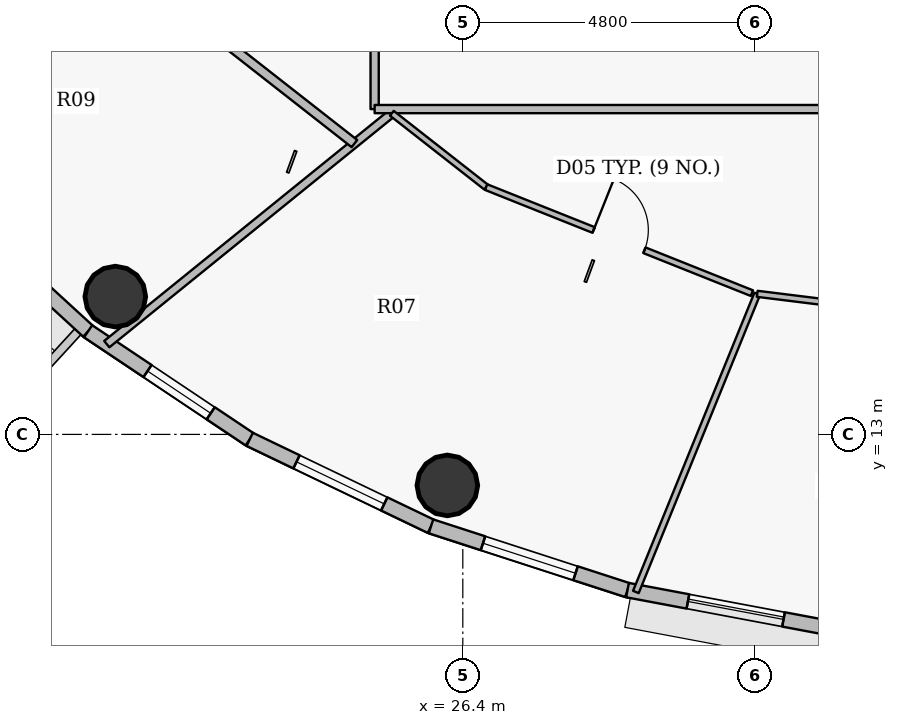
"""IFC4 building model, lengths in metres.
Left out: names, types, materials, properties, quantities, classifications, styles, units other than length and angle.
Written with IfcOpenShell. Run it as: python <this file> out.ifc"""

import sys

from ifc_helpers import new_model, si_unit, direction, frame, frame_2d, origin, origin_2d, place, context, subcontext, project, spatial, rectangle, hollow_circle, extrude, source, transform, mapped, element, fill, save


model = new_model("IFC4")
c1 = context("Model", 3, precision=1e-05, world=origin(), true_north=direction((0.0, 1.0)))
c2 = subcontext(c1, "Body", "Model", "MODEL_VIEW")
j1 = project(units=[si_unit("LENGTHUNIT", "METRE"), si_unit("PLANEANGLEUNIT", "RADIAN")], contexts=[c1])
p1 = place(None, origin())
s1 = spatial("IfcSite", under=j1, at=p1, CompositionType="ELEMENT")
p2 = place(p1, origin())
s2 = spatial("IfcBuilding", under=s1, at=p2, CompositionType="ELEMENT")
p3 = place(p2, frame((0.0, 0.0, 306.75)))
s3 = spatial("IfcBuildingStorey", under=s2, at=p3, CompositionType="ELEMENT", Elevation=306.75)
for number, where, z_axis, x_axis in (
    (1, (20.685, 15.267, 0.0), (0.0, 0.0, 1.0), (1.0, 0.0, 0.0)),
    (2, (26.146, 12.161, 0.0), (0.0, 0.0, 1.0), (1.0, 0.0, 0.0)),
):
    element("IfcColumn", number, at=place(p3, frame(where, z_axis=z_axis, x_axis=x_axis)), inside=s3, PredefinedType="COLUMN", context=c2, shape_type="SweptSolid", body=[
        extrude(hollow_circle(Radius=0.5, WallThickness=0.032, at=origin_2d()), origin(), (0.0, 0.0, 1.0), 3.75),
    ])
p4 = place(p3, frame((20.238, 14.696, 0.0), z_axis=(0.0, 0.0, 1.0), x_axis=(-0.737068506972, 0.675818034703, 0.0)))
e3 = element("IfcWall", 3, at=p4, inside=s3, PredefinedType="SOLIDWALL", context=c2, shape_type="SweptSolid", body=[
    extrude(rectangle(XDim=3.077, YDim=0.24, at=frame_2d((1.539, 0.0))), origin(), (0.0, 0.0, 1.0), 3.5),
])
p5 = place(p3, frame((22.896, 12.918, 0.0), z_axis=(0.0, 0.0, 1.0), x_axis=(-0.831250592635, 0.55589787933, 0.0)))
e4 = element("IfcWall", 4, at=p5, inside=s3, PredefinedType="SOLIDWALL", context=c2, shape_type="SweptSolid", body=[
    extrude(rectangle(XDim=3.197, YDim=0.24, at=frame_2d((1.599, 0.0))), origin(), (0.0, 0.0, 1.0), 3.5),
])
p6 = place(p5, frame((0.772, 0.0, 0.9)))
e5 = element("IfcOpeningElement", 5, at=p6, cuts=e4, PredefinedType="OPENING", context=c2, shape_type="SweptSolid", body=[
    extrude(rectangle(XDim=1.25, YDim=1.65, at=origin_2d()), frame((0.625, 0.13, 0.825), z_axis=(0.0, -1.0, 0.0), x_axis=(1.0, 0.0, 0.0)), (0.0, 0.0, 1.0), 0.26),
])
p7 = place(p3, frame((25.877, 11.488, 0.0), z_axis=(0.0, 0.0, 1.0), x_axis=(-0.901573741254, 0.43262546051, 0.0)))
e6 = element("IfcWall", 6, at=p7, inside=s3, PredefinedType="SOLIDWALL", context=c2, shape_type="SweptSolid", body=[
    extrude(rectangle(XDim=3.307, YDim=0.24, at=frame_2d((1.653, 0.0))), origin(), (0.0, 0.0, 1.0), 3.5),
])
p8 = place(p7, frame((0.853, 0.0, 0.9)))
e7 = element("IfcOpeningElement", 7, at=p8, cuts=e6, PredefinedType="OPENING", context=c2, shape_type="SweptSolid", body=[
    extrude(rectangle(XDim=1.6, YDim=1.75, at=origin_2d()), frame((0.8, 0.13, 0.875), z_axis=(0.0, -1.0, 0.0), x_axis=(1.0, 0.0, 0.0)), (0.0, 0.0, 1.0), 0.26),
])
p9 = place(p3, frame((29.109, 10.44, 0.0), z_axis=(0.0, 0.0, 1.0), x_axis=(-0.95123136723, 0.308478339592, 0.0)))
e8 = element("IfcWall", 8, at=p9, inside=s3, PredefinedType="SOLIDWALL", context=c2, shape_type="SweptSolid", body=[
    extrude(rectangle(XDim=3.398, YDim=0.24, at=frame_2d((1.699, 0.0))), origin(), (0.0, 0.0, 1.0), 3.5),
])
p10 = place(p9, frame((0.899, 0.0, 0.9)))
e9 = element("IfcOpeningElement", 9, at=p10, cuts=e8, PredefinedType="OPENING", context=c2, shape_type="SweptSolid", body=[
    extrude(rectangle(XDim=1.6, YDim=1.75, at=origin_2d()), frame((0.8, 0.13, 0.875), z_axis=(0.0, -1.0, 0.0), x_axis=(1.0, 0.0, 0.0)), (0.0, 0.0, 1.0), 0.26),
])
p11 = place(p3, frame((32.511, 9.8, 0.0), z_axis=(0.0, 0.0, 1.0), x_axis=(-0.982782655757, 0.184765395959, 0.0)))
e10 = element("IfcWall", 10, at=p11, inside=s3, PredefinedType="SOLIDWALL", context=c2, shape_type="SweptSolid", body=[
    extrude(rectangle(XDim=3.462, YDim=0.24, at=frame_2d((1.731, 0.0))), origin(), (0.0, 0.0, 1.0), 3.5),
])
p12 = place(p11, frame((0.851, 0.0, 0.9)))
e11 = element("IfcOpeningElement", 11, at=p12, cuts=e10, PredefinedType="OPENING", context=c2, shape_type="SweptSolid", body=[
    extrude(rectangle(XDim=1.6, YDim=1.75, at=origin_2d()), frame((0.8, 0.13, 0.875), z_axis=(0.0, -1.0, 0.0), x_axis=(1.0, 0.0, 0.0)), (0.0, 0.0, 1.0), 0.26),
])
p13 = place(p3, frame((20.545, 14.485, 0.0), z_axis=(0.0, 0.0, 1.0), x_axis=(0.77715155867, 0.629313479004, 0.0)))
e12 = element("IfcWall", 12, at=p13, inside=s3, PredefinedType="PARTITIONING", context=c2, shape_type="SweptSolid", body=[
    extrude(rectangle(XDim=6.032, YDim=0.135, at=frame_2d((3.016, 0.0))), origin(), (0.0, 0.0, 1.0), 2.985),
])
p14 = place(p3, frame((22.59, 19.371, 0.0), z_axis=(0.0, 0.0, 1.0), x_axis=(0.78729093539, -0.616581692116, 0.0)))
e13 = element("IfcWall", 13, at=p14, inside=s3, PredefinedType="PARTITIONING", context=c2, shape_type="SweptSolid", body=[
    extrude(rectangle(XDim=2.576, YDim=0.15, at=frame_2d((1.288, 0.0))), origin(), (0.0, 0.0, 1.0), 3.035),
])
p15 = place(p3, frame((24.95, 18.35, 0.0), z_axis=(0.0, 0.0, 1.0), x_axis=(0.0, 1.0, 0.0)))
e14 = element("IfcWall", 14, at=p15, inside=s3, PredefinedType="PARTITIONING", context=c2, shape_type="SweptSolid", body=[
    extrude(rectangle(XDim=11.45, YDim=0.135, at=frame_2d((5.725, 0.0))), origin(), (0.0, 0.0, 1.0), 3.035),
])
p16 = place(p15, frame((7.931, 0.0, 0.0)))
e15 = element("IfcOpeningElement", 15, at=p16, cuts=e14, PredefinedType="OPENING", context=c2, shape_type="SweptSolid", body=[
    extrude(rectangle(XDim=1.05, YDim=2.15, at=origin_2d()), frame((0.525, 0.078, 1.075), z_axis=(0.0, -1.0, 0.0), x_axis=(1.0, 0.0, 0.0)), (0.0, 0.0, 1.0), 0.155),
])
p17 = place(p15, frame((2.361, 0.0, 0.0)))
e16 = element("IfcOpeningElement", 16, at=p17, cuts=e14, PredefinedType="OPENING", context=c2, shape_type="SweptSolid", body=[
    extrude(rectangle(XDim=0.82, YDim=2.1, at=origin_2d()), frame((0.41, 0.078, 1.05), z_axis=(0.0, -1.0, 0.0), x_axis=(1.0, 0.0, 0.0)), (0.0, 0.0, 1.0), 0.155),
])
p18 = place(p3, frame((24.95, 18.35, 0.0), z_axis=(0.0, 0.0, 1.0), x_axis=(1.0, 0.0, 0.0)))
e17 = element("IfcWall", 17, at=p18, inside=s3, PredefinedType="PARTITIONING", context=c2, shape_type="SweptSolid", body=[
    extrude(rectangle(XDim=19.311, YDim=0.135, at=frame_2d((9.655, 0.0))), origin(), (0.0, 0.0, 1.0), 3.035),
])
p19 = place(p18, frame((9.319, 0.0, 0.0)))
e18 = element("IfcOpeningElement", 18, at=p19, cuts=e17, PredefinedType="OPENING", context=c2, shape_type="SweptSolid", body=[
    extrude(rectangle(XDim=1.0, YDim=2.15, at=origin_2d()), frame((0.5, 0.078, 1.075), z_axis=(0.0, -1.0, 0.0), x_axis=(1.0, 0.0, 0.0)), (0.0, 0.0, 1.0), 0.155),
])
p20 = place(p3, frame((25.233, 18.281, 0.0), z_axis=(0.0, 0.0, 1.0), x_axis=(0.787345395334, -0.61651214785, 0.0)))
e19 = element("IfcWall", 19, at=p20, inside=s3, PredefinedType="PARTITIONING", context=c2, shape_type="SweptSolid", body=[
    extrude(rectangle(XDim=1.969, YDim=0.1, at=frame_2d((0.985, 0.0))), origin(), (0.0, 0.0, 1.0), 3.5),
])
p21 = place(p3, frame((26.783, 17.067, 0.0), z_axis=(0.0, 0.0, 1.0), x_axis=(0.928809047774, -0.370558703544, 0.0)))
e20 = element("IfcWall", 20, at=p21, inside=s3, PredefinedType="PARTITIONING", context=c2, shape_type="SweptSolid", body=[
    extrude(rectangle(XDim=4.706, YDim=0.1, at=frame_2d((2.353, 0.0))), origin(), (0.0, 0.0, 1.0), 3.035),
])
p22 = place(p21, frame((1.903, 0.0, 0.0)))
e21 = element("IfcOpeningElement", 21, at=p22, cuts=e20, PredefinedType="OPENING", context=c2, shape_type="SweptSolid", body=[
    extrude(rectangle(XDim=0.9, YDim=2.1, at=origin_2d()), frame((0.45, 0.06, 1.05), z_axis=(0.0, -1.0, 0.0), x_axis=(1.0, 0.0, 0.0)), (0.0, 0.0, 1.0), 0.12),
])
p23 = place(p3, frame((29.246, 10.409, 0.0), z_axis=(0.0, 0.0, 1.0), x_axis=(0.377005355791, 0.926211078375, 0.0)))
e22 = element("IfcWall", 22, at=p23, inside=s3, PredefinedType="PARTITIONING", context=c2, shape_type="SweptSolid", body=[
    extrude(rectangle(XDim=5.294, YDim=0.1, at=frame_2d((2.647, 0.0))), origin(), (0.0, 0.0, 1.0), 2.985),
])
p24 = place(p3, frame((31.242, 15.312, 0.0), z_axis=(0.0, 0.0, 1.0), x_axis=(0.992396501967, -0.123082016895, 0.0)))
e23 = element("IfcWall", 23, at=p24, inside=s3, PredefinedType="PARTITIONING", context=c2, shape_type="SweptSolid", body=[
    extrude(rectangle(XDim=4.794, YDim=0.1, at=frame_2d((2.397, 0.0))), origin(), (0.0, 0.0, 1.0), 2.985),
])
p25 = place(p24, frame((1.947, 0.0, 0.0)))
e24 = element("IfcOpeningElement", 24, at=p25, cuts=e23, PredefinedType="OPENING", context=c2, shape_type="SweptSolid", body=[
    extrude(rectangle(XDim=0.9, YDim=2.1, at=origin_2d()), frame((0.45, 0.06, 1.05), z_axis=(0.0, -1.0, 0.0), x_axis=(1.0, 0.0, 0.0)), (0.0, 0.0, 1.0), 0.12),
])
m1 = source(origin(), c2, "Body", "SweptSolid", [
    extrude(rectangle(XDim=1.25, YDim=1.65, at=origin_2d()), frame((0.625, 0.03, 0.825), z_axis=(0.0, -1.0, 0.0), x_axis=(1.0, 0.0, 0.0)), (0.0, 0.0, 1.0), 0.06),
])
p26 = place(p6, origin())
e25 = element("IfcWindow", 25, at=p26, inside=s3, PartitioningType="SINGLE_PANEL", PredefinedType="WINDOW", context=c2, shape_type="MappedRepresentation", body=[
    mapped(m1, transform((0.0, 0.0, 0.0), x_axis=(1.0, 0.0, 0.0), y_axis=(0.0, 1.0, 0.0), z_axis=(0.0, 0.0, 1.0), scale=1.0)),
])
fill(e5, e25)
m2 = source(origin(), c2, "Body", "SweptSolid", [
    extrude(rectangle(XDim=1.6, YDim=1.75, at=origin_2d()), frame((0.8, 0.03, 0.875), z_axis=(0.0, -1.0, 0.0), x_axis=(1.0, 0.0, 0.0)), (0.0, 0.0, 1.0), 0.06),
])
p27 = place(p8, origin())
e26 = element("IfcWindow", 26, at=p27, inside=s3, PartitioningType="DOUBLE_PANEL_VERTICAL", PredefinedType="WINDOW", context=c2, shape_type="MappedRepresentation", body=[
    mapped(m2, transform((0.0, 0.0, 0.0), x_axis=(1.0, 0.0, 0.0), y_axis=(0.0, 1.0, 0.0), z_axis=(0.0, 0.0, 1.0), scale=1.0)),
])
fill(e7, e26)
p28 = place(p10, origin())
e27 = element("IfcWindow", 27, at=p28, inside=s3, PartitioningType="DOUBLE_PANEL_VERTICAL", PredefinedType="WINDOW", context=c2, shape_type="MappedRepresentation", body=[
    mapped(m2, transform((0.0, 0.0, 0.0), x_axis=(1.0, 0.0, 0.0), y_axis=(0.0, 1.0, 0.0), z_axis=(0.0, 0.0, 1.0), scale=1.0)),
])
fill(e9, e27)
p29 = place(p12, origin())
e28 = element("IfcWindow", 28, at=p29, inside=s3, PartitioningType="DOUBLE_PANEL_VERTICAL", PredefinedType="WINDOW", context=c2, shape_type="MappedRepresentation", body=[
    mapped(m2, transform((0.0, 0.0, 0.0), x_axis=(1.0, 0.0, 0.0), y_axis=(0.0, 1.0, 0.0), z_axis=(0.0, 0.0, 1.0), scale=1.0)),
])
fill(e11, e28)
m3 = source(origin(), c2, "Body", "SweptSolid", [
    extrude(rectangle(XDim=0.9, YDim=2.1, at=origin_2d()), frame((0.45, 0.025, 1.05), z_axis=(0.0, -1.0, 0.0), x_axis=(1.0, 0.0, 0.0)), (0.0, 0.0, 1.0), 0.05),
])
p30 = place(p22, origin())
e29 = element("IfcDoor", 29, at=p30, inside=s3, OperationType="SINGLE_SWING_LEFT", PredefinedType="DOOR", context=c2, shape_type="MappedRepresentation", body=[
    mapped(m3, transform((0.0, 0.0, 0.0), x_axis=(1.0, 0.0, 0.0), y_axis=(0.0, 1.0, 0.0), z_axis=(0.0, 0.0, 1.0), scale=1.0)),
])
fill(e21, e29)
save(model, sys.argv[1])
